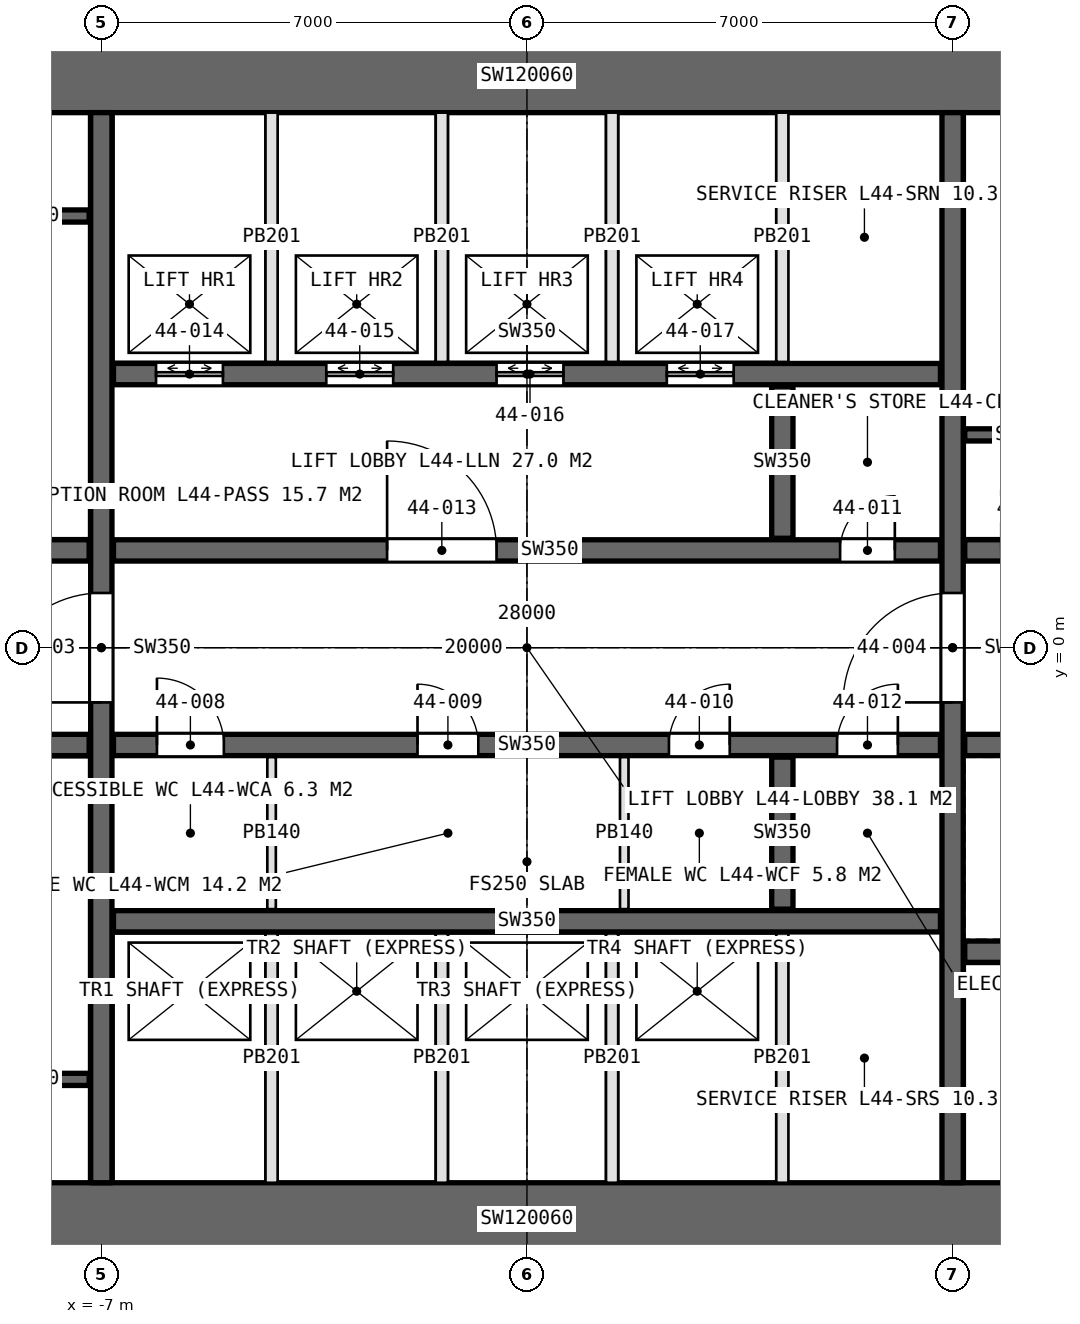
"""IFC4 building model, lengths in metres.
Left out: names, types, materials, properties, quantities, classifications, styles, units other than length and angle.
Written with IfcOpenShell. Run it as: python <this file> out.ifc"""

import sys

from ifc_helpers import new_model, si_unit, direction, frame, frame_2d, origin, place, context, subcontext, project, spatial, rectangle, extrude, element, fill, save


model = new_model("IFC4")
c1 = context("Model", 3, precision=1e-05, world=origin(), true_north=direction((0.0, 1.0)))
c2 = subcontext(c1, "Body", "Model", "MODEL_VIEW")
j1 = project(units=[si_unit("LENGTHUNIT", "METRE"), si_unit("PLANEANGLEUNIT", "RADIAN")], contexts=[c1])
p1 = place(None, origin())
s1 = spatial("IfcSite", under=j1, at=p1, CompositionType="ELEMENT")
p2 = place(p1, origin())
s2 = spatial("IfcBuilding", under=s1, at=p2, CompositionType="ELEMENT")
p3 = place(p2, frame((0.0, 0.0, 203.2)))
s3 = spatial("IfcBuildingStorey", under=s2, at=p3, CompositionType="ELEMENT", Elevation=203.2)
p4 = place(p3, frame((-14.0, -9.4, 0.0), z_axis=(0.0, 0.0, 1.0), x_axis=(1.0, 0.0, 0.0)))
e1 = element("IfcWall", 1, at=p4, inside=s3, PredefinedType="SHEAR", context=c2, shape_type="SweptSolid", body=[
    extrude(rectangle(XDim=28.0, YDim=1.2, at=frame_2d((14.0, 0.0))), origin(), (0.0, 0.0, 1.0), 4.2),
])
p5 = place(p4, frame((22.9, 0.0, 0.0)))
e2 = element("IfcOpeningElement", 2, at=p5, cuts=e1, PredefinedType="OPENING", context=c2, shape_type="SweptSolid", body=[
    extrude(rectangle(XDim=2.2, YDim=2.7, at=frame_2d((1.1, 1.35))), frame((0.0, 0.61, 0.0), z_axis=(0.0, -1.0, 0.0), x_axis=(1.0, 0.0, 0.0)), (0.0, 0.0, 1.0), 1.22),
])
p6 = place(p3, frame((14.0, 9.4, 0.0), z_axis=(0.0, 0.0, 1.0), x_axis=(-1.0, 0.0, 0.0)))
e3 = element("IfcWall", 3, at=p6, inside=s3, PredefinedType="SHEAR", context=c2, shape_type="SweptSolid", body=[
    extrude(rectangle(XDim=28.0, YDim=1.2, at=frame_2d((14.0, 0.0))), origin(), (0.0, 0.0, 1.0), 4.2),
])
p7 = place(p6, frame((24.0, 0.0, 0.0)))
e4 = element("IfcOpeningElement", 4, at=p7, cuts=e3, PredefinedType="OPENING", context=c2, shape_type="SweptSolid", body=[
    extrude(rectangle(XDim=1.0, YDim=2.4, at=frame_2d((0.5, 1.2))), frame((0.0, 0.61, 0.0), z_axis=(0.0, -1.0, 0.0), x_axis=(1.0, 0.0, 0.0)), (0.0, 0.0, 1.0), 1.22),
])
p8 = place(p3, frame((-7.0, -8.8, 0.0), z_axis=(0.0, 0.0, 1.0), x_axis=(0.0, 1.0, 0.0)))
e5 = element("IfcWall", 5, at=p8, inside=s3, PredefinedType="SHEAR", context=c2, shape_type="SweptSolid", body=[
    extrude(rectangle(XDim=17.6, YDim=0.35, at=frame_2d((8.8, 0.0))), origin(), (0.0, 0.0, 1.0), 4.2),
])
p9 = place(p8, frame((7.9, 0.0, 0.0)))
e6 = element("IfcOpeningElement", 6, at=p9, cuts=e5, PredefinedType="OPENING", context=c2, shape_type="SweptSolid", body=[
    extrude(rectangle(XDim=1.8, YDim=2.4, at=frame_2d((0.9, 1.2))), frame((0.0, 0.185, 0.0), z_axis=(0.0, -1.0, 0.0), x_axis=(1.0, 0.0, 0.0)), (0.0, 0.0, 1.0), 0.37),
])
p10 = place(p3, frame((7.0, -8.8, 0.0), z_axis=(0.0, 0.0, 1.0), x_axis=(0.0, 1.0, 0.0)))
e7 = element("IfcWall", 7, at=p10, inside=s3, PredefinedType="SHEAR", context=c2, shape_type="SweptSolid", body=[
    extrude(rectangle(XDim=17.6, YDim=0.35, at=frame_2d((8.8, 0.0))), origin(), (0.0, 0.0, 1.0), 4.2),
])
p11 = place(p10, frame((7.9, 0.0, 0.0)))
e8 = element("IfcOpeningElement", 8, at=p11, cuts=e7, PredefinedType="OPENING", context=c2, shape_type="SweptSolid", body=[
    extrude(rectangle(XDim=1.8, YDim=2.4, at=frame_2d((0.9, 1.2))), frame((0.0, 0.185, 0.0), z_axis=(0.0, -1.0, 0.0), x_axis=(1.0, 0.0, 0.0)), (0.0, 0.0, 1.0), 0.37),
])
p12 = place(p3, frame((-6.8, 1.6, 0.0), z_axis=(0.0, 0.0, 1.0), x_axis=(1.0, 0.0, 0.0)))
e9 = element("IfcWall", 9, at=p12, inside=s3, PredefinedType="SHEAR", context=c2, shape_type="SweptSolid", body=[
    extrude(rectangle(XDim=13.6, YDim=0.35, at=frame_2d((6.8, 0.0))), origin(), (0.0, 0.0, 1.0), 4.2),
])
p13 = place(p12, frame((11.95, 0.0, 0.0)))
e10 = element("IfcOpeningElement", 10, at=p13, cuts=e9, PredefinedType="OPENING", context=c2, shape_type="SweptSolid", body=[
    extrude(rectangle(XDim=0.9, YDim=2.4, at=frame_2d((0.45, 1.2))), frame((0.0, 0.185, 0.0), z_axis=(0.0, -1.0, 0.0), x_axis=(1.0, 0.0, 0.0)), (0.0, 0.0, 1.0), 0.37),
])
p14 = place(p12, frame((4.5, 0.0, 0.0)))
e11 = element("IfcOpeningElement", 11, at=p14, cuts=e9, PredefinedType="OPENING", context=c2, shape_type="SweptSolid", body=[
    extrude(rectangle(XDim=1.8, YDim=2.4, at=frame_2d((0.9, 1.2))), frame((0.0, 0.185, 0.0), z_axis=(0.0, -1.0, 0.0), x_axis=(1.0, 0.0, 0.0)), (0.0, 0.0, 1.0), 0.37),
])
p15 = place(p3, frame((-6.8, -1.6, 0.0), z_axis=(0.0, 0.0, 1.0), x_axis=(1.0, 0.0, 0.0)))
e12 = element("IfcWall", 12, at=p15, inside=s3, PredefinedType="SHEAR", context=c2, shape_type="SweptSolid", body=[
    extrude(rectangle(XDim=13.6, YDim=0.35, at=frame_2d((6.8, 0.0))), origin(), (0.0, 0.0, 1.0), 4.2),
])
p16 = place(p15, frame((0.715, 0.0, 0.0)))
e13 = element("IfcOpeningElement", 13, at=p16, cuts=e12, PredefinedType="OPENING", context=c2, shape_type="SweptSolid", body=[
    extrude(rectangle(XDim=1.1, YDim=2.4, at=frame_2d((0.55, 1.2))), frame((0.0, 0.185, 0.0), z_axis=(0.0, -1.0, 0.0), x_axis=(1.0, 0.0, 0.0)), (0.0, 0.0, 1.0), 0.37),
])
p17 = place(p15, frame((5.0, 0.0, 0.0)))
e14 = element("IfcOpeningElement", 14, at=p17, cuts=e12, PredefinedType="OPENING", context=c2, shape_type="SweptSolid", body=[
    extrude(rectangle(XDim=1.0, YDim=2.4, at=frame_2d((0.5, 1.2))), frame((0.0, 0.185, 0.0), z_axis=(0.0, -1.0, 0.0), x_axis=(1.0, 0.0, 0.0)), (0.0, 0.0, 1.0), 0.37),
])
p18 = place(p15, frame((9.135, 0.0, 0.0)))
e15 = element("IfcOpeningElement", 15, at=p18, cuts=e12, PredefinedType="OPENING", context=c2, shape_type="SweptSolid", body=[
    extrude(rectangle(XDim=1.0, YDim=2.4, at=frame_2d((0.5, 1.2))), frame((0.0, 0.185, 0.0), z_axis=(0.0, -1.0, 0.0), x_axis=(1.0, 0.0, 0.0)), (0.0, 0.0, 1.0), 0.37),
])
p19 = place(p15, frame((11.9, 0.0, 0.0)))
e16 = element("IfcOpeningElement", 16, at=p19, cuts=e12, PredefinedType="OPENING", context=c2, shape_type="SweptSolid", body=[
    extrude(rectangle(XDim=1.0, YDim=2.4, at=frame_2d((0.5, 1.2))), frame((0.0, 0.185, 0.0), z_axis=(0.0, -1.0, 0.0), x_axis=(1.0, 0.0, 0.0)), (0.0, 0.0, 1.0), 0.37),
])
p20 = place(p3, frame((-6.8, 4.5, 0.0), z_axis=(0.0, 0.0, 1.0), x_axis=(1.0, 0.0, 0.0)))
e17 = element("IfcWall", 17, at=p20, inside=s3, PredefinedType="SHEAR", context=c2, shape_type="SweptSolid", body=[
    extrude(rectangle(XDim=13.6, YDim=0.35, at=frame_2d((6.8, 0.0))), origin(), (0.0, 0.0, 1.0), 4.2),
])
p21 = place(p20, frame((0.7, 0.0, 0.0)))
e18 = element("IfcOpeningElement", 18, at=p21, cuts=e17, PredefinedType="OPENING", context=c2, shape_type="SweptSolid", body=[
    extrude(rectangle(XDim=1.1, YDim=2.4, at=frame_2d((0.55, 1.2))), frame((0.0, 0.185, 0.0), z_axis=(0.0, -1.0, 0.0), x_axis=(1.0, 0.0, 0.0)), (0.0, 0.0, 1.0), 0.37),
])
p22 = place(p20, frame((3.5, 0.0, 0.0)))
e19 = element("IfcOpeningElement", 19, at=p22, cuts=e17, PredefinedType="OPENING", context=c2, shape_type="SweptSolid", body=[
    extrude(rectangle(XDim=1.1, YDim=2.4, at=frame_2d((0.55, 1.2))), frame((0.0, 0.185, 0.0), z_axis=(0.0, -1.0, 0.0), x_axis=(1.0, 0.0, 0.0)), (0.0, 0.0, 1.0), 0.37),
])
p23 = place(p20, frame((6.3, 0.0, 0.0)))
e20 = element("IfcOpeningElement", 20, at=p23, cuts=e17, PredefinedType="OPENING", context=c2, shape_type="SweptSolid", body=[
    extrude(rectangle(XDim=1.1, YDim=2.4, at=frame_2d((0.55, 1.2))), frame((0.0, 0.185, 0.0), z_axis=(0.0, -1.0, 0.0), x_axis=(1.0, 0.0, 0.0)), (0.0, 0.0, 1.0), 0.37),
])
p24 = place(p20, frame((9.1, 0.0, 0.0)))
e21 = element("IfcOpeningElement", 21, at=p24, cuts=e17, PredefinedType="OPENING", context=c2, shape_type="SweptSolid", body=[
    extrude(rectangle(XDim=1.1, YDim=2.4, at=frame_2d((0.55, 1.2))), frame((0.0, 0.185, 0.0), z_axis=(0.0, -1.0, 0.0), x_axis=(1.0, 0.0, 0.0)), (0.0, 0.0, 1.0), 0.37),
])
p25 = place(p3, frame((-6.8, -4.5, 0.0), z_axis=(0.0, 0.0, 1.0), x_axis=(1.0, 0.0, 0.0)))
e22 = element("IfcWall", 22, at=p25, inside=s3, PredefinedType="SHEAR", context=c2, shape_type="SweptSolid", body=[
    extrude(rectangle(XDim=13.6, YDim=0.35, at=frame_2d((6.8, 0.0))), origin(), (0.0, 0.0, 1.0), 4.2),
])
for number, where, z_axis, x_axis in (
    (23, (-12.8, 1.6, 0.0), (0.0, 0.0, 1.0), (1.0, 0.0, 0.0)),
    (24, (-12.8, -1.6, 0.0), (0.0, 0.0, 1.0), (1.0, 0.0, 0.0)),
):
    element("IfcWall", number, at=place(p3, frame(where, z_axis=z_axis, x_axis=x_axis)), inside=s3, PredefinedType="SHEAR", context=c2, shape_type="SweptSolid", body=[
        extrude(rectangle(XDim=5.6, YDim=0.35, at=frame_2d((2.8, 0.0))), origin(), (0.0, 0.0, 1.0), 4.2),
    ])
p26 = place(p3, frame((7.2, 1.6, 0.0), z_axis=(0.0, 0.0, 1.0), x_axis=(1.0, 0.0, 0.0)))
e25 = element("IfcWall", 25, at=p26, inside=s3, PredefinedType="SHEAR", context=c2, shape_type="SweptSolid", body=[
    extrude(rectangle(XDim=5.6, YDim=0.35, at=frame_2d((2.8, 0.0))), origin(), (0.0, 0.0, 1.0), 4.2),
])
p27 = place(p26, frame((0.6, 0.0, 0.0)))
e26 = element("IfcOpeningElement", 26, at=p27, cuts=e25, PredefinedType="OPENING", context=c2, shape_type="SweptSolid", body=[
    extrude(rectangle(XDim=1.0, YDim=2.4, at=frame_2d((0.5, 1.2))), frame((0.0, 0.185, 0.0), z_axis=(0.0, -1.0, 0.0), x_axis=(1.0, 0.0, 0.0)), (0.0, 0.0, 1.0), 0.37),
])
p28 = place(p3, frame((7.2, -1.6, 0.0), z_axis=(0.0, 0.0, 1.0), x_axis=(1.0, 0.0, 0.0)))
e27 = element("IfcWall", 27, at=p28, inside=s3, PredefinedType="SHEAR", context=c2, shape_type="SweptSolid", body=[
    extrude(rectangle(XDim=5.6, YDim=0.35, at=frame_2d((2.8, 0.0))), origin(), (0.0, 0.0, 1.0), 4.2),
])
p29 = place(p28, frame((0.9, 0.0, 0.0)))
e28 = element("IfcOpeningElement", 28, at=p29, cuts=e27, PredefinedType="OPENING", context=c2, shape_type="SweptSolid", body=[
    extrude(rectangle(XDim=1.3, YDim=2.4, at=frame_2d((0.65, 1.2))), frame((0.0, 0.185, 0.0), z_axis=(0.0, -1.0, 0.0), x_axis=(1.0, 0.0, 0.0)), (0.0, 0.0, 1.0), 0.37),
])
p30 = place(p28, frame((3.9, 0.0, 0.0)))
e29 = element("IfcOpeningElement", 29, at=p30, cuts=e27, PredefinedType="OPENING", context=c2, shape_type="SweptSolid", body=[
    extrude(rectangle(XDim=1.3, YDim=2.4, at=frame_2d((0.65, 1.2))), frame((0.0, 0.185, 0.0), z_axis=(0.0, -1.0, 0.0), x_axis=(1.0, 0.0, 0.0)), (0.0, 0.0, 1.0), 0.37),
])
p31 = place(p3, frame((7.2, -5.0, 0.0), z_axis=(0.0, 0.0, 1.0), x_axis=(1.0, 0.0, 0.0)))
e30 = element("IfcWall", 30, at=p31, inside=s3, PredefinedType="SHEAR", context=c2, shape_type="SweptSolid", body=[
    extrude(rectangle(XDim=5.6, YDim=0.35, at=frame_2d((2.8, 0.0))), origin(), (0.0, 0.0, 1.0), 4.2),
])
for number, where, z_axis, x_axis in (
    (31, (4.2, 1.8, 0.0), (0.0, 0.0, 1.0), (0.0, 1.0, 0.0)),
    (32, (4.2, -4.3, 0.0), (0.0, 0.0, 1.0), (0.0, 1.0, 0.0)),
):
    element("IfcWall", number, at=place(p3, frame(where, z_axis=z_axis, x_axis=x_axis)), inside=s3, PredefinedType="SHEAR", context=c2, shape_type="SweptSolid", body=[
        extrude(rectangle(XDim=2.5, YDim=0.35, at=frame_2d((1.25, 0.0))), origin(), (0.0, 0.0, 1.0), 4.2),
    ])
for number, where, z_axis, x_axis in (
    (33, (-4.2, -1.8, 0.0), (0.0, 0.0, 1.0), (0.0, -1.0, 0.0)),
    (34, (1.6, -1.8, 0.0), (0.0, 0.0, 1.0), (0.0, -1.0, 0.0)),
):
    element("IfcWall", number, at=place(p3, frame(where, z_axis=z_axis, x_axis=x_axis)), inside=s3, PredefinedType="PARTITIONING", context=c2, shape_type="SweptSolid", body=[
        extrude(rectangle(XDim=2.5, YDim=0.14, at=frame_2d((1.25, 0.0))), origin(), (0.0, 0.0, 1.0), 3.95),
    ])
for number, where, z_axis, x_axis in (
    (35, (-4.2, 4.7, 0.0), (0.0, 0.0, 1.0), (0.0, 1.0, 0.0)),
    (36, (-1.4, 4.7, 0.0), (0.0, 0.0, 1.0), (0.0, 1.0, 0.0)),
    (37, (1.4, 4.7, 0.0), (0.0, 0.0, 1.0), (0.0, 1.0, 0.0)),
    (38, (4.2, 4.7, 0.0), (0.0, 0.0, 1.0), (0.0, 1.0, 0.0)),
    (39, (-4.2, -4.7, 0.0), (0.0, 0.0, 1.0), (0.0, -1.0, 0.0)),
    (40, (-1.4, -4.7, 0.0), (0.0, 0.0, 1.0), (0.0, -1.0, 0.0)),
    (41, (1.4, -4.7, 0.0), (0.0, 0.0, 1.0), (0.0, -1.0, 0.0)),
    (42, (4.2, -4.7, 0.0), (0.0, 0.0, 1.0), (0.0, -1.0, 0.0)),
):
    element("IfcWall", number, at=place(p3, frame(where, z_axis=z_axis, x_axis=x_axis)), inside=s3, PredefinedType="PARTITIONING", context=c2, shape_type="SweptSolid", body=[
        extrude(rectangle(XDim=4.1, YDim=0.2, at=frame_2d((2.05, 0.0))), origin(), (0.0, 0.0, 1.0), 4.2),
    ])
for number, where, z_axis, x_axis in (
    (43, (-9.15, 7.1, 0.0), (0.0, 0.0, 1.0), (1.0, 0.0, 0.0)),
    (44, (-9.15, -7.1, 0.0), (0.0, 0.0, 1.0), (1.0, 0.0, 0.0)),
    (45, (9.15, 3.5, 0.0), (0.0, 0.0, 1.0), (-1.0, 0.0, 0.0)),
):
    element("IfcWall", number, at=place(p3, frame(where, z_axis=z_axis, x_axis=x_axis)), inside=s3, PredefinedType="SOLIDWALL", context=c2, shape_type="SweptSolid", body=[
        extrude(rectangle(XDim=1.95, YDim=0.2, at=frame_2d((0.975, 0.0))), origin(), (0.0, 0.0, 1.0), 4.2),
    ])
p32 = place(p9, origin())
e46 = element("IfcDoor", 46, at=p32, inside=s3, OperationType="DOUBLE_DOOR_SINGLE_SWING", PredefinedType="DOOR", context=c2, shape_type="SweptSolid", body=[
    extrude(rectangle(XDim=1.8, YDim=2.4, at=frame_2d((0.9, 1.2))), frame((0.0, 0.025, 0.0), z_axis=(0.0, -1.0, 0.0), x_axis=(1.0, 0.0, 0.0)), (0.0, 0.0, 1.0), 0.05),
])
fill(e6, e46)
p33 = place(p11, origin())
e47 = element("IfcDoor", 47, at=p33, inside=s3, OperationType="DOUBLE_DOOR_SINGLE_SWING", PredefinedType="DOOR", context=c2, shape_type="SweptSolid", body=[
    extrude(rectangle(XDim=1.8, YDim=2.4, at=frame_2d((0.9, 1.2))), frame((0.0, 0.025, 0.0), z_axis=(0.0, -1.0, 0.0), x_axis=(1.0, 0.0, 0.0)), (0.0, 0.0, 1.0), 0.05),
])
fill(e8, e47)
p34 = place(p16, origin())
e48 = element("IfcDoor", 48, at=p34, inside=s3, OperationType="SINGLE_SWING_LEFT", PredefinedType="DOOR", context=c2, shape_type="SweptSolid", body=[
    extrude(rectangle(XDim=1.1, YDim=2.4, at=frame_2d((0.55, 1.2))), frame((0.0, 0.025, 0.0), z_axis=(0.0, -1.0, 0.0), x_axis=(1.0, 0.0, 0.0)), (0.0, 0.0, 1.0), 0.05),
])
fill(e13, e48)
p35 = place(p17, origin())
e49 = element("IfcDoor", 49, at=p35, inside=s3, OperationType="SINGLE_SWING_LEFT", PredefinedType="DOOR", context=c2, shape_type="SweptSolid", body=[
    extrude(rectangle(XDim=1.0, YDim=2.4, at=frame_2d((0.5, 1.2))), frame((0.0, 0.025, 0.0), z_axis=(0.0, -1.0, 0.0), x_axis=(1.0, 0.0, 0.0)), (0.0, 0.0, 1.0), 0.05),
])
fill(e14, e49)
p36 = place(p18, origin())
e50 = element("IfcDoor", 50, at=p36, inside=s3, OperationType="SINGLE_SWING_RIGHT", PredefinedType="DOOR", context=c2, shape_type="SweptSolid", body=[
    extrude(rectangle(XDim=1.0, YDim=2.4, at=frame_2d((0.5, 1.2))), frame((0.0, 0.025, 0.0), z_axis=(0.0, -1.0, 0.0), x_axis=(1.0, 0.0, 0.0)), (0.0, 0.0, 1.0), 0.05),
])
fill(e15, e50)
p37 = place(p13, origin())
e51 = element("IfcDoor", 51, at=p37, inside=s3, OperationType="SINGLE_SWING_RIGHT", PredefinedType="DOOR", context=c2, shape_type="SweptSolid", body=[
    extrude(rectangle(XDim=0.9, YDim=2.4, at=frame_2d((0.45, 1.2))), frame((0.0, 0.025, 0.0), z_axis=(0.0, -1.0, 0.0), x_axis=(1.0, 0.0, 0.0)), (0.0, 0.0, 1.0), 0.05),
])
fill(e10, e51)
p38 = place(p19, origin())
e52 = element("IfcDoor", 52, at=p38, inside=s3, OperationType="SINGLE_SWING_RIGHT", PredefinedType="DOOR", context=c2, shape_type="SweptSolid", body=[
    extrude(rectangle(XDim=1.0, YDim=2.4, at=frame_2d((0.5, 1.2))), frame((0.0, 0.025, 0.0), z_axis=(0.0, -1.0, 0.0), x_axis=(1.0, 0.0, 0.0)), (0.0, 0.0, 1.0), 0.05),
])
fill(e16, e52)
p39 = place(p14, origin())
e53 = element("IfcDoor", 53, at=p39, inside=s3, OperationType="DOUBLE_DOOR_SINGLE_SWING", PredefinedType="DOOR", context=c2, shape_type="SweptSolid", body=[
    extrude(rectangle(XDim=1.8, YDim=2.4, at=frame_2d((0.9, 1.2))), frame((0.0, 0.025, 0.0), z_axis=(0.0, -1.0, 0.0), x_axis=(1.0, 0.0, 0.0)), (0.0, 0.0, 1.0), 0.05),
])
fill(e11, e53)
p40 = place(p21, origin())
e54 = element("IfcDoor", 54, at=p40, inside=s3, OperationType="DOUBLE_DOOR_SLIDING", PredefinedType="DOOR", context=c2, shape_type="SweptSolid", body=[
    extrude(rectangle(XDim=1.1, YDim=2.4, at=frame_2d((0.55, 1.2))), frame((0.0, 0.025, 0.0), z_axis=(0.0, -1.0, 0.0), x_axis=(1.0, 0.0, 0.0)), (0.0, 0.0, 1.0), 0.05),
])
fill(e18, e54)
p41 = place(p22, origin())
e55 = element("IfcDoor", 55, at=p41, inside=s3, OperationType="DOUBLE_DOOR_SLIDING", PredefinedType="DOOR", context=c2, shape_type="SweptSolid", body=[
    extrude(rectangle(XDim=1.1, YDim=2.4, at=frame_2d((0.55, 1.2))), frame((0.0, 0.025, 0.0), z_axis=(0.0, -1.0, 0.0), x_axis=(1.0, 0.0, 0.0)), (0.0, 0.0, 1.0), 0.05),
])
fill(e19, e55)
p42 = place(p23, origin())
e56 = element("IfcDoor", 56, at=p42, inside=s3, OperationType="DOUBLE_DOOR_SLIDING", PredefinedType="DOOR", context=c2, shape_type="SweptSolid", body=[
    extrude(rectangle(XDim=1.1, YDim=2.4, at=frame_2d((0.55, 1.2))), frame((0.0, 0.025, 0.0), z_axis=(0.0, -1.0, 0.0), x_axis=(1.0, 0.0, 0.0)), (0.0, 0.0, 1.0), 0.05),
])
fill(e20, e56)
p43 = place(p24, origin())
e57 = element("IfcDoor", 57, at=p43, inside=s3, OperationType="DOUBLE_DOOR_SLIDING", PredefinedType="DOOR", context=c2, shape_type="SweptSolid", body=[
    extrude(rectangle(XDim=1.1, YDim=2.4, at=frame_2d((0.55, 1.2))), frame((0.0, 0.025, 0.0), z_axis=(0.0, -1.0, 0.0), x_axis=(1.0, 0.0, 0.0)), (0.0, 0.0, 1.0), 0.05),
])
fill(e21, e57)
save(model, sys.argv[1])
